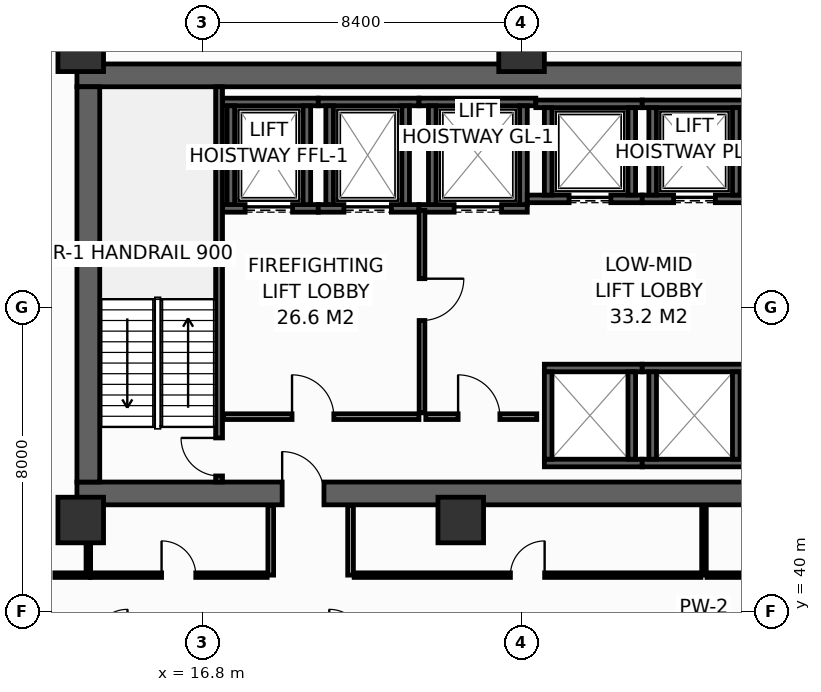
"""IFC4 building model, lengths in metres.
Left out: names, types, materials, properties, quantities, classifications, styles, units other than length and angle.
Written with IfcOpenShell. Run it as: python <this file> out.ifc"""

import sys

from ifc_helpers import new_model, si_unit, direction, frame, frame_2d, origin, origin_2d, place, context, subcontext, project, spatial, rectangle, hollow_rectangle, extrude, element, fill, save


model = new_model("IFC4")
c1 = context("Model", 3, precision=1e-05, world=origin(), true_north=direction((0.0, 1.0)))
c2 = subcontext(c1, "Body", "Model", "MODEL_VIEW")
j1 = project(units=[si_unit("LENGTHUNIT", "METRE"), si_unit("PLANEANGLEUNIT", "RADIAN")], contexts=[c1])
p1 = place(None, origin())
s1 = spatial("IfcSite", under=j1, at=p1, CompositionType="ELEMENT")
p2 = place(p1, origin())
s2 = spatial("IfcBuilding", under=s1, at=p2, CompositionType="ELEMENT")
p3 = place(p2, frame((0.0, 0.0, 92.8)))
s3 = spatial("IfcBuildingStorey", under=s2, at=p3, CompositionType="ELEMENT", Elevation=92.8)
p4 = place(p3, frame((13.5, 43.1, 0.0), z_axis=(0.0, 0.0, 1.0), x_axis=(1.0, 0.0, 0.0)))
e1 = element("IfcWall", 1, at=p4, inside=s3, PredefinedType="SHEAR", context=c2, shape_type="SweptSolid", body=[
    extrude(rectangle(XDim=32.9, YDim=0.6, at=frame_2d((16.45, 0.0))), origin(), (0.0, 0.0, 1.0), 4.15),
])
p5 = place(p4, frame((5.4, 0.0, 0.0)))
e2 = element("IfcOpeningElement", 2, at=p5, cuts=e1, PredefinedType="OPENING", context=c2, shape_type="SweptSolid", body=[
    extrude(rectangle(XDim=1.1, YDim=2.15, at=frame_2d((0.55, 1.075))), frame((0.0, 0.31, 0.0), z_axis=(0.0, -1.0, 0.0), x_axis=(1.0, 0.0, 0.0)), (0.0, 0.0, 1.0), 0.62),
])
p6 = place(p4, frame((25.6, 0.0, 0.0)))
e3 = element("IfcOpeningElement", 3, at=p6, cuts=e1, PredefinedType="OPENING", context=c2, shape_type="SweptSolid", body=[
    extrude(rectangle(XDim=1.1, YDim=2.15, at=frame_2d((0.55, 1.075))), frame((0.0, 0.31, 0.0), z_axis=(0.0, -1.0, 0.0), x_axis=(1.0, 0.0, 0.0)), (0.0, 0.0, 1.0), 0.62),
])
p7 = place(p3, frame((13.5, 54.1, 0.0), z_axis=(0.0, 0.0, 1.0), x_axis=(1.0, 0.0, 0.0)))
e4 = element("IfcWall", 4, at=p7, inside=s3, PredefinedType="SHEAR", context=c2, shape_type="SweptSolid", body=[
    extrude(rectangle(XDim=32.9, YDim=0.6, at=frame_2d((16.45, 0.0))), origin(), (0.0, 0.0, 1.0), 4.15),
])
p8 = place(p3, frame((13.8, 43.4, 0.0), z_axis=(0.0, 0.0, 1.0), x_axis=(0.0, 1.0, 0.0)))
e5 = element("IfcWall", 5, at=p8, inside=s3, PredefinedType="SHEAR", context=c2, shape_type="SweptSolid", body=[
    extrude(rectangle(XDim=10.4, YDim=0.6, at=frame_2d((5.2, 0.0))), origin(), (0.0, 0.0, 1.0), 4.15),
])
for number, where, z_axis, x_axis in (
    (6, (13.6, 54.8, 0.0), (0.0, 0.0, 1.0), (1.0, 0.0, 0.0)),
    (7, (25.2, 54.8, 0.0), (0.0, 0.0, 1.0), (1.0, 0.0, 0.0)),
    (8, (13.6, 42.4, 0.0), (0.0, 0.0, 1.0), (1.0, 0.0, 0.0)),
    (9, (23.6, 42.4, 0.0), (0.0, 0.0, 1.0), (1.0, 0.0, 0.0)),
):
    element("IfcColumn", number, at=place(p3, frame(where, z_axis=z_axis, x_axis=x_axis)), inside=s3, PredefinedType="COLUMN", context=c2, shape_type="SweptSolid", body=[
        extrude(hollow_rectangle(XDim=1.2, YDim=1.2, WallThickness=0.055, at=origin_2d()), origin(), (0.0, 0.0, 1.0), 4.4),
    ])
p9 = place(p3, frame((17.33, 50.6, 0.0), z_axis=(0.0, 0.0, 1.0), x_axis=(1.0, 0.0, 0.0)))
e10 = element("IfcWall", 10, at=p9, inside=s3, PredefinedType="SHEAR", context=c2, shape_type="SweptSolid", body=[
    extrude(rectangle(XDim=2.52, YDim=0.2, at=frame_2d((1.26, 0.0))), origin(), (0.0, 0.0, 1.0), 4.15),
])
p10 = place(p9, frame((0.595, 0.0, 0.0)))
e11 = element("IfcOpeningElement", 11, at=p10, cuts=e10, PredefinedType="OPENING", context=c2, shape_type="SweptSolid", body=[
    extrude(rectangle(XDim=1.25, YDim=2.3, at=frame_2d((0.625, 1.15))), frame((0.0, 0.11, 0.0), z_axis=(0.0, -1.0, 0.0), x_axis=(1.0, 0.0, 0.0)), (0.0, 0.0, 1.0), 0.22),
])
p11 = place(p3, frame((17.33, 53.4, 0.0), z_axis=(0.0, 0.0, 1.0), x_axis=(1.0, 0.0, 0.0)))
e12 = element("IfcWall", 12, at=p11, inside=s3, PredefinedType="SHEAR", context=c2, shape_type="SweptSolid", body=[
    extrude(rectangle(XDim=2.52, YDim=0.2, at=frame_2d((1.26, 0.0))), origin(), (0.0, 0.0, 1.0), 4.15),
])
for number, where, z_axis, x_axis in (
    (13, (17.55, 50.7, 0.0), (0.0, 0.0, 1.0), (0.0, 1.0, 0.0)),
    (14, (19.55, 50.7, 0.0), (0.0, 0.0, 1.0), (0.0, 1.0, 0.0)),
):
    element("IfcWall", number, at=place(p3, frame(where, z_axis=z_axis, x_axis=x_axis)), inside=s3, PredefinedType="SHEAR", context=c2, shape_type="SweptSolid", body=[
        extrude(rectangle(XDim=2.6, YDim=0.2, at=frame_2d((1.3, 0.0))), origin(), (0.0, 0.0, 1.0), 4.15),
    ])
p12 = place(p3, frame((19.85, 50.6, 0.0), z_axis=(0.0, 0.0, 1.0), x_axis=(1.0, 0.0, 0.0)))
e15 = element("IfcWall", 15, at=p12, inside=s3, PredefinedType="SHEAR", context=c2, shape_type="SweptSolid", body=[
    extrude(rectangle(XDim=2.65, YDim=0.2, at=frame_2d((1.325, 0.0))), origin(), (0.0, 0.0, 1.0), 4.15),
])
p13 = place(p12, frame((0.675, 0.0, 0.0)))
e16 = element("IfcOpeningElement", 16, at=p13, cuts=e15, PredefinedType="OPENING", context=c2, shape_type="SweptSolid", body=[
    extrude(rectangle(XDim=1.25, YDim=2.3, at=frame_2d((0.625, 1.15))), frame((0.0, 0.11, 0.0), z_axis=(0.0, -1.0, 0.0), x_axis=(1.0, 0.0, 0.0)), (0.0, 0.0, 1.0), 0.22),
])
p14 = place(p3, frame((19.85, 53.4, 0.0), z_axis=(0.0, 0.0, 1.0), x_axis=(1.0, 0.0, 0.0)))
e17 = element("IfcWall", 17, at=p14, inside=s3, PredefinedType="SHEAR", context=c2, shape_type="SweptSolid", body=[
    extrude(rectangle(XDim=2.65, YDim=0.2, at=frame_2d((1.325, 0.0))), origin(), (0.0, 0.0, 1.0), 4.15),
])
for number, where, z_axis, x_axis in (
    (18, (20.15, 50.7, 0.0), (0.0, 0.0, 1.0), (0.0, 1.0, 0.0)),
    (19, (22.15, 50.7, 0.0), (0.0, 0.0, 1.0), (0.0, 1.0, 0.0)),
):
    element("IfcWall", number, at=place(p3, frame(where, z_axis=z_axis, x_axis=x_axis)), inside=s3, PredefinedType="SHEAR", context=c2, shape_type="SweptSolid", body=[
        extrude(rectangle(XDim=2.6, YDim=0.2, at=frame_2d((1.3, 0.0))), origin(), (0.0, 0.0, 1.0), 4.15),
    ])
p15 = place(p3, frame((22.5, 50.6, 0.0), z_axis=(0.0, 0.0, 1.0), x_axis=(1.0, 0.0, 0.0)))
e20 = element("IfcWall", 20, at=p15, inside=s3, PredefinedType="SHEAR", context=c2, shape_type="SweptSolid", body=[
    extrude(rectangle(XDim=2.85, YDim=0.2, at=frame_2d((1.425, 0.0))), origin(), (0.0, 0.0, 1.0), 4.15),
])
p16 = place(p15, frame((0.925, 0.0, 0.0)))
e21 = element("IfcOpeningElement", 21, at=p16, cuts=e20, PredefinedType="OPENING", context=c2, shape_type="SweptSolid", body=[
    extrude(rectangle(XDim=1.25, YDim=2.3, at=frame_2d((0.625, 1.15))), frame((0.0, 0.11, 0.0), z_axis=(0.0, -1.0, 0.0), x_axis=(1.0, 0.0, 0.0)), (0.0, 0.0, 1.0), 0.22),
])
p17 = place(p3, frame((22.5, 53.4, 0.0), z_axis=(0.0, 0.0, 1.0), x_axis=(1.0, 0.0, 0.0)))
e22 = element("IfcWall", 22, at=p17, inside=s3, PredefinedType="SHEAR", context=c2, shape_type="SweptSolid", body=[
    extrude(rectangle(XDim=3.075, YDim=0.2, at=frame_2d((1.538, 0.0))), origin(), (0.0, 0.0, 1.0), 4.15),
])
for number, where, z_axis, x_axis in (
    (23, (22.85, 50.7, 0.0), (0.0, 0.0, 1.0), (0.0, 1.0, 0.0)),
    (24, (25.25, 50.7, 0.0), (0.0, 0.0, 1.0), (0.0, 1.0, 0.0)),
):
    element("IfcWall", number, at=place(p3, frame(where, z_axis=z_axis, x_axis=x_axis)), inside=s3, PredefinedType="SHEAR", context=c2, shape_type="SweptSolid", body=[
        extrude(rectangle(XDim=2.6, YDim=0.2, at=frame_2d((1.3, 0.0))), origin(), (0.0, 0.0, 1.0), 4.15),
    ])
p18 = place(p3, frame((25.35, 50.85, 0.0), z_axis=(0.0, 0.0, 1.0), x_axis=(1.0, 0.0, 0.0)))
e25 = element("IfcWall", 25, at=p18, inside=s3, PredefinedType="SHEAR", context=c2, shape_type="SweptSolid", body=[
    extrude(rectangle(XDim=3.025, YDim=0.2, at=frame_2d((1.512, 0.0))), origin(), (0.0, 0.0, 1.0), 4.15),
])
p19 = place(p18, frame((1.1, 0.0, 0.0)))
e26 = element("IfcOpeningElement", 26, at=p19, cuts=e25, PredefinedType="OPENING", context=c2, shape_type="SweptSolid", body=[
    extrude(rectangle(XDim=1.1, YDim=2.2, at=frame_2d((0.55, 1.1))), frame((0.0, 0.11, 0.0), z_axis=(0.0, -1.0, 0.0), x_axis=(1.0, 0.0, 0.0)), (0.0, 0.0, 1.0), 0.22),
])
p20 = place(p3, frame((25.575, 53.35, 0.0), z_axis=(0.0, 0.0, 1.0), x_axis=(1.0, 0.0, 0.0)))
e27 = element("IfcWall", 27, at=p20, inside=s3, PredefinedType="SHEAR", context=c2, shape_type="SweptSolid", body=[
    extrude(rectangle(XDim=2.8, YDim=0.2, at=frame_2d((1.4, 0.0))), origin(), (0.0, 0.0, 1.0), 4.15),
])
for number, where, z_axis, x_axis in (
    (28, (25.9, 50.95, 0.0), (0.0, 0.0, 1.0), (0.0, 1.0, 0.0)),
    (29, (28.1, 50.95, 0.0), (0.0, 0.0, 1.0), (0.0, 1.0, 0.0)),
):
    element("IfcWall", number, at=place(p3, frame(where, z_axis=z_axis, x_axis=x_axis)), inside=s3, PredefinedType="SHEAR", context=c2, shape_type="SweptSolid", body=[
        extrude(rectangle(XDim=2.3, YDim=0.2, at=frame_2d((1.15, 0.0))), origin(), (0.0, 0.0, 1.0), 4.15),
    ])
p21 = place(p3, frame((28.375, 50.85, 0.0), z_axis=(0.0, 0.0, 1.0), x_axis=(1.0, 0.0, 0.0)))
e30 = element("IfcWall", 30, at=p21, inside=s3, PredefinedType="SHEAR", context=c2, shape_type="SweptSolid", body=[
    extrude(rectangle(XDim=2.75, YDim=0.2, at=frame_2d((1.375, 0.0))), origin(), (0.0, 0.0, 1.0), 4.15),
])
p22 = place(p21, frame((0.825, 0.0, 0.0)))
e31 = element("IfcOpeningElement", 31, at=p22, cuts=e30, PredefinedType="OPENING", context=c2, shape_type="SweptSolid", body=[
    extrude(rectangle(XDim=1.1, YDim=2.2, at=frame_2d((0.55, 1.1))), frame((0.0, 0.11, 0.0), z_axis=(0.0, -1.0, 0.0), x_axis=(1.0, 0.0, 0.0)), (0.0, 0.0, 1.0), 0.22),
])
p23 = place(p3, frame((28.375, 53.35, 0.0), z_axis=(0.0, 0.0, 1.0), x_axis=(1.0, 0.0, 0.0)))
e32 = element("IfcWall", 32, at=p23, inside=s3, PredefinedType="SHEAR", context=c2, shape_type="SweptSolid", body=[
    extrude(rectangle(XDim=2.75, YDim=0.2, at=frame_2d((1.375, 0.0))), origin(), (0.0, 0.0, 1.0), 4.15),
])
for number, where, z_axis, x_axis in (
    (33, (28.65, 50.95, 0.0), (0.0, 0.0, 1.0), (0.0, 1.0, 0.0)),
    (34, (30.85, 50.95, 0.0), (0.0, 0.0, 1.0), (0.0, 1.0, 0.0)),
):
    element("IfcWall", number, at=place(p3, frame(where, z_axis=z_axis, x_axis=x_axis)), inside=s3, PredefinedType="SHEAR", context=c2, shape_type="SweptSolid", body=[
        extrude(rectangle(XDim=2.3, YDim=0.2, at=frame_2d((1.15, 0.0))), origin(), (0.0, 0.0, 1.0), 4.15),
    ])
for number, where, z_axis, x_axis in (
    (35, (25.8, 43.9, 0.0), (0.0, 0.0, 1.0), (1.0, 0.0, 0.0)),
    (36, (25.8, 46.4, 0.0), (0.0, 0.0, 1.0), (1.0, 0.0, 0.0)),
):
    element("IfcWall", number, at=place(p3, frame(where, z_axis=z_axis, x_axis=x_axis)), inside=s3, PredefinedType="SHEAR", context=c2, shape_type="SweptSolid", body=[
        extrude(rectangle(XDim=2.575, YDim=0.2, at=frame_2d((1.288, 0.0))), origin(), (0.0, 0.0, 1.0), 4.15),
    ])
for number, where, z_axis, x_axis in (
    (37, (25.9, 44.0, 0.0), (0.0, 0.0, 1.0), (0.0, 1.0, 0.0)),
    (38, (28.1, 44.0, 0.0), (0.0, 0.0, 1.0), (0.0, 1.0, 0.0)),
):
    element("IfcWall", number, at=place(p3, frame(where, z_axis=z_axis, x_axis=x_axis)), inside=s3, PredefinedType="SHEAR", context=c2, shape_type="SweptSolid", body=[
        extrude(rectangle(XDim=2.3, YDim=0.2, at=frame_2d((1.15, 0.0))), origin(), (0.0, 0.0, 1.0), 4.15),
    ])
for number, where, z_axis, x_axis in (
    (39, (28.375, 43.9, 0.0), (0.0, 0.0, 1.0), (1.0, 0.0, 0.0)),
    (40, (28.375, 46.4, 0.0), (0.0, 0.0, 1.0), (1.0, 0.0, 0.0)),
):
    element("IfcWall", number, at=place(p3, frame(where, z_axis=z_axis, x_axis=x_axis)), inside=s3, PredefinedType="SHEAR", context=c2, shape_type="SweptSolid", body=[
        extrude(rectangle(XDim=2.75, YDim=0.2, at=frame_2d((1.375, 0.0))), origin(), (0.0, 0.0, 1.0), 4.15),
    ])
for number, where, z_axis, x_axis in (
    (41, (28.65, 44.0, 0.0), (0.0, 0.0, 1.0), (0.0, 1.0, 0.0)),
    (42, (30.85, 44.0, 0.0), (0.0, 0.0, 1.0), (0.0, 1.0, 0.0)),
):
    element("IfcWall", number, at=place(p3, frame(where, z_axis=z_axis, x_axis=x_axis)), inside=s3, PredefinedType="SHEAR", context=c2, shape_type="SweptSolid", body=[
        extrude(rectangle(XDim=2.3, YDim=0.2, at=frame_2d((1.15, 0.0))), origin(), (0.0, 0.0, 1.0), 4.15),
    ])
p24 = place(p3, frame((17.24, 43.4, 0.0), z_axis=(0.0, 0.0, 1.0), x_axis=(0.0, 1.0, 0.0)))
e43 = element("IfcWall", 43, at=p24, inside=s3, PredefinedType="SHEAR", context=c2, shape_type="SweptSolid", body=[
    extrude(rectangle(XDim=10.4, YDim=0.18, at=frame_2d((5.2, 0.0))), origin(), (0.0, 0.0, 1.0), 4.15),
])
p25 = place(p24, frame((0.16, 0.0, 0.0)))
e44 = element("IfcOpeningElement", 44, at=p25, cuts=e43, PredefinedType="OPENING", context=c2, shape_type="SweptSolid", body=[
    extrude(rectangle(XDim=1.0, YDim=2.15, at=frame_2d((0.5, 1.075))), frame((0.0, 0.1, 0.0), z_axis=(0.0, -1.0, 0.0), x_axis=(1.0, 0.0, 0.0)), (0.0, 0.0, 1.0), 0.2),
])
p26 = place(p3, frame((17.36, 45.12, 0.0), z_axis=(0.0, 0.0, 1.0), x_axis=(1.0, 0.0, 0.0)))
e45 = element("IfcWall", 45, at=p26, inside=s3, PredefinedType="PARTITIONING", context=c2, shape_type="SweptSolid", body=[
    extrude(rectangle(XDim=5.14, YDim=0.15, at=frame_2d((2.57, 0.0))), origin(), (0.0, 0.0, 1.0), 4.15),
])
p27 = place(p26, frame((1.8, 0.0, 0.0)))
e46 = element("IfcOpeningElement", 46, at=p27, cuts=e45, PredefinedType="OPENING", context=c2, shape_type="SweptSolid", body=[
    extrude(rectangle(XDim=1.1, YDim=2.15, at=frame_2d((0.55, 1.075))), frame((0.0, 0.085, 0.0), z_axis=(0.0, -1.0, 0.0), x_axis=(1.0, 0.0, 0.0)), (0.0, 0.0, 1.0), 0.17),
])
p28 = place(p3, frame((22.58, 50.55, 0.0), z_axis=(0.0, 0.0, 1.0), x_axis=(0.0, -1.0, 0.0)))
e47 = element("IfcWall", 47, at=p28, inside=s3, PredefinedType="PARTITIONING", context=c2, shape_type="SweptSolid", body=[
    extrude(rectangle(XDim=5.33, YDim=0.15, at=frame_2d((2.665, 0.0))), origin(), (0.0, 0.0, 1.0), 4.15),
])
p29 = place(p28, frame((1.8, 0.0, 0.0)))
e48 = element("IfcOpeningElement", 48, at=p29, cuts=e47, PredefinedType="OPENING", context=c2, shape_type="SweptSolid", body=[
    extrude(rectangle(XDim=1.1, YDim=2.15, at=frame_2d((0.55, 1.075))), frame((0.0, 0.085, 0.0), z_axis=(0.0, -1.0, 0.0), x_axis=(1.0, 0.0, 0.0)), (0.0, 0.0, 1.0), 0.17),
])
p30 = place(p3, frame((22.68, 45.12, 0.0), z_axis=(0.0, 0.0, 1.0), x_axis=(1.0, 0.0, 0.0)))
e49 = element("IfcWall", 49, at=p30, inside=s3, PredefinedType="PARTITIONING", context=c2, shape_type="SweptSolid", body=[
    extrude(rectangle(XDim=2.92, YDim=0.15, at=frame_2d((1.46, 0.0))), origin(), (0.0, 0.0, 1.0), 4.15),
])
p31 = place(p30, frame((0.85, 0.0, 0.0)))
e50 = element("IfcOpeningElement", 50, at=p31, cuts=e49, PredefinedType="OPENING", context=c2, shape_type="SweptSolid", body=[
    extrude(rectangle(XDim=1.1, YDim=2.15, at=frame_2d((0.55, 1.075))), frame((0.0, 0.085, 0.0), z_axis=(0.0, -1.0, 0.0), x_axis=(1.0, 0.0, 0.0)), (0.0, 0.0, 1.0), 0.17),
])
p32 = place(p3, frame((12.92, 40.95, 0.0), z_axis=(0.0, 0.0, 1.0), x_axis=(1.0, 0.0, 0.0)))
e51 = element("IfcWall", 51, at=p32, inside=s3, PredefinedType="PARTITIONING", context=c2, shape_type="SweptSolid", body=[
    extrude(rectangle(XDim=0.93, YDim=0.12, at=frame_2d((0.465, 0.0))), origin(), (0.0, 0.0, 1.0), 4.15),
])
p33 = place(p3, frame((13.8, 41.03, 0.0), z_axis=(0.0, 0.0, 1.0), x_axis=(0.0, 1.0, 0.0)))
e52 = element("IfcWall", 52, at=p33, inside=s3, PredefinedType="PARTITIONING", context=c2, shape_type="SweptSolid", body=[
    extrude(rectangle(XDim=1.75, YDim=0.12, at=frame_2d((0.875, 0.0))), origin(), (0.0, 0.0, 1.0), 4.15),
])
for number, where, z_axis, x_axis in (
    (53, (18.6, 40.95, 0.0), (0.0, 0.0, 1.0), (0.0, 1.0, 0.0)),
    (54, (20.7, 40.95, 0.0), (0.0, 0.0, 1.0), (0.0, 1.0, 0.0)),
):
    element("IfcWall", number, at=place(p3, frame(where, z_axis=z_axis, x_axis=x_axis)), inside=s3, PredefinedType="PARTITIONING", context=c2, shape_type="SweptSolid", body=[
        extrude(rectangle(XDim=1.83, YDim=0.15, at=frame_2d((0.915, 0.0))), origin(), (0.0, 0.0, 1.0), 4.15),
    ])
p34 = place(p3, frame((13.85, 40.95, 0.0), z_axis=(0.0, 0.0, 1.0), x_axis=(1.0, 0.0, 0.0)))
e55 = element("IfcWall", 55, at=p34, inside=s3, PredefinedType="PARTITIONING", context=c2, shape_type="SweptSolid", body=[
    extrude(rectangle(XDim=4.655, YDim=0.12, at=frame_2d((2.327, 0.0))), origin(), (0.0, 0.0, 1.0), 4.15),
])
p35 = place(p34, frame((1.877, 0.0, 0.0)))
e56 = element("IfcOpeningElement", 56, at=p35, cuts=e55, PredefinedType="OPENING", context=c2, shape_type="SweptSolid", body=[
    extrude(rectangle(XDim=0.9, YDim=2.1, at=frame_2d((0.45, 1.05))), frame((0.0, 0.07, 0.0), z_axis=(0.0, -1.0, 0.0), x_axis=(1.0, 0.0, 0.0)), (0.0, 0.0, 1.0), 0.14),
])
p36 = place(p3, frame((30.0, 40.95, 0.0), z_axis=(0.0, 0.0, 1.0), x_axis=(0.0, 1.0, 0.0)))
e57 = element("IfcWall", 57, at=p36, inside=s3, PredefinedType="PARTITIONING", context=c2, shape_type="SweptSolid", body=[
    extrude(rectangle(XDim=1.83, YDim=0.12, at=frame_2d((0.915, 0.0))), origin(), (0.0, 0.0, 1.0), 3.335),
])
p37 = place(p3, frame((20.795, 40.95, 0.0), z_axis=(0.0, 0.0, 1.0), x_axis=(1.0, 0.0, 0.0)))
e58 = element("IfcWall", 58, at=p37, inside=s3, PredefinedType="PARTITIONING", context=c2, shape_type="SweptSolid", body=[
    extrude(rectangle(XDim=9.125, YDim=0.12, at=frame_2d((4.562, 0.0))), origin(), (0.0, 0.0, 1.0), 3.335),
])
p38 = place(p37, frame((4.112, 0.0, 0.0)))
e59 = element("IfcOpeningElement", 59, at=p38, cuts=e58, PredefinedType="OPENING", context=c2, shape_type="SweptSolid", body=[
    extrude(rectangle(XDim=0.9, YDim=2.1, at=frame_2d((0.45, 1.05))), frame((0.0, 0.07, 0.0), z_axis=(0.0, -1.0, 0.0), x_axis=(1.0, 0.0, 0.0)), (0.0, 0.0, 1.0), 0.14),
])
p39 = place(p3, frame((30.08, 40.95, 0.0), z_axis=(0.0, 0.0, 1.0), x_axis=(1.0, 0.0, 0.0)))
e60 = element("IfcWall", 60, at=p39, inside=s3, PredefinedType="PARTITIONING", context=c2, shape_type="SweptSolid", body=[
    extrude(rectangle(XDim=8.625, YDim=0.12, at=frame_2d((4.312, 0.0))), origin(), (0.0, 0.0, 1.0), 3.335),
])
p40 = place(p39, frame((3.788, 0.0, 0.0)))
e61 = element("IfcOpeningElement", 61, at=p40, cuts=e60, PredefinedType="OPENING", context=c2, shape_type="SweptSolid", body=[
    extrude(rectangle(XDim=1.05, YDim=2.15, at=frame_2d((0.525, 1.075))), frame((0.0, 0.07, 0.0), z_axis=(0.0, -1.0, 0.0), x_axis=(1.0, 0.0, 0.0)), (0.0, 0.0, 1.0), 0.14),
])
p41 = place(p10, origin())
e62 = element("IfcDoor", 62, at=p41, inside=s3, OperationType="SLIDING_TO_LEFT", PredefinedType="DOOR", context=c2, shape_type="SweptSolid", body=[
    extrude(rectangle(XDim=1.25, YDim=2.3, at=frame_2d((0.625, 1.15))), frame((0.0, 0.025, 0.0), z_axis=(0.0, -1.0, 0.0), x_axis=(1.0, 0.0, 0.0)), (0.0, 0.0, 1.0), 0.05),
])
fill(e11, e62)
p42 = place(p13, origin())
e63 = element("IfcDoor", 63, at=p42, inside=s3, OperationType="SLIDING_TO_LEFT", PredefinedType="DOOR", context=c2, shape_type="SweptSolid", body=[
    extrude(rectangle(XDim=1.25, YDim=2.3, at=frame_2d((0.625, 1.15))), frame((0.0, 0.025, 0.0), z_axis=(0.0, -1.0, 0.0), x_axis=(1.0, 0.0, 0.0)), (0.0, 0.0, 1.0), 0.05),
])
fill(e16, e63)
p43 = place(p16, origin())
e64 = element("IfcDoor", 64, at=p43, inside=s3, OperationType="SLIDING_TO_LEFT", PredefinedType="DOOR", context=c2, shape_type="SweptSolid", body=[
    extrude(rectangle(XDim=1.25, YDim=2.3, at=frame_2d((0.625, 1.15))), frame((0.0, 0.025, 0.0), z_axis=(0.0, -1.0, 0.0), x_axis=(1.0, 0.0, 0.0)), (0.0, 0.0, 1.0), 0.05),
])
fill(e21, e64)
p44 = place(p19, origin())
e65 = element("IfcDoor", 65, at=p44, inside=s3, OperationType="SLIDING_TO_LEFT", PredefinedType="DOOR", context=c2, shape_type="SweptSolid", body=[
    extrude(rectangle(XDim=1.1, YDim=2.2, at=frame_2d((0.55, 1.1))), frame((0.0, 0.025, 0.0), z_axis=(0.0, -1.0, 0.0), x_axis=(1.0, 0.0, 0.0)), (0.0, 0.0, 1.0), 0.05),
])
fill(e26, e65)
p45 = place(p22, origin())
e66 = element("IfcDoor", 66, at=p45, inside=s3, OperationType="SLIDING_TO_LEFT", PredefinedType="DOOR", context=c2, shape_type="SweptSolid", body=[
    extrude(rectangle(XDim=1.1, YDim=2.2, at=frame_2d((0.55, 1.1))), frame((0.0, 0.025, 0.0), z_axis=(0.0, -1.0, 0.0), x_axis=(1.0, 0.0, 0.0)), (0.0, 0.0, 1.0), 0.05),
])
fill(e31, e66)
p46 = place(p25, origin())
e67 = element("IfcDoor", 67, at=p46, inside=s3, OperationType="SINGLE_SWING_RIGHT", PredefinedType="DOOR", context=c2, shape_type="SweptSolid", body=[
    extrude(rectangle(XDim=1.0, YDim=2.15, at=frame_2d((0.5, 1.075))), frame((0.0, 0.025, 0.0), z_axis=(0.0, -1.0, 0.0), x_axis=(1.0, 0.0, 0.0)), (0.0, 0.0, 1.0), 0.05),
])
fill(e44, e67)
p47 = place(p27, origin())
e68 = element("IfcDoor", 68, at=p47, inside=s3, OperationType="SINGLE_SWING_LEFT", PredefinedType="DOOR", context=c2, shape_type="SweptSolid", body=[
    extrude(rectangle(XDim=1.1, YDim=2.15, at=frame_2d((0.55, 1.075))), frame((0.0, 0.025, 0.0), z_axis=(0.0, -1.0, 0.0), x_axis=(1.0, 0.0, 0.0)), (0.0, 0.0, 1.0), 0.05),
])
fill(e46, e68)
p48 = place(p29, origin())
e69 = element("IfcDoor", 69, at=p48, inside=s3, OperationType="SINGLE_SWING_LEFT", PredefinedType="DOOR", context=c2, shape_type="SweptSolid", body=[
    extrude(rectangle(XDim=1.1, YDim=2.15, at=frame_2d((0.55, 1.075))), frame((0.0, 0.025, 0.0), z_axis=(0.0, -1.0, 0.0), x_axis=(1.0, 0.0, 0.0)), (0.0, 0.0, 1.0), 0.05),
])
fill(e48, e69)
p49 = place(p31, origin())
e70 = element("IfcDoor", 70, at=p49, inside=s3, OperationType="SINGLE_SWING_LEFT", PredefinedType="DOOR", context=c2, shape_type="SweptSolid", body=[
    extrude(rectangle(XDim=1.1, YDim=2.15, at=frame_2d((0.55, 1.075))), frame((0.0, 0.025, 0.0), z_axis=(0.0, -1.0, 0.0), x_axis=(1.0, 0.0, 0.0)), (0.0, 0.0, 1.0), 0.05),
])
fill(e50, e70)
p50 = place(p5, origin())
e71 = element("IfcDoor", 71, at=p50, inside=s3, OperationType="SINGLE_SWING_LEFT", PredefinedType="DOOR", context=c2, shape_type="SweptSolid", body=[
    extrude(rectangle(XDim=1.1, YDim=2.15, at=frame_2d((0.55, 1.075))), frame((0.0, 0.025, 0.0), z_axis=(0.0, -1.0, 0.0), x_axis=(1.0, 0.0, 0.0)), (0.0, 0.0, 1.0), 0.05),
])
fill(e2, e71)
p51 = place(p35, origin())
e72 = element("IfcDoor", 72, at=p51, inside=s3, OperationType="SINGLE_SWING_LEFT", PredefinedType="DOOR", context=c2, shape_type="SweptSolid", body=[
    extrude(rectangle(XDim=0.9, YDim=2.1, at=frame_2d((0.45, 1.05))), frame((0.0, 0.025, 0.0), z_axis=(0.0, -1.0, 0.0), x_axis=(1.0, 0.0, 0.0)), (0.0, 0.0, 1.0), 0.05),
])
fill(e56, e72)
p52 = place(p38, origin())
e73 = element("IfcDoor", 73, at=p52, inside=s3, OperationType="SINGLE_SWING_RIGHT", PredefinedType="DOOR", context=c2, shape_type="SweptSolid", body=[
    extrude(rectangle(XDim=0.9, YDim=2.1, at=frame_2d((0.45, 1.05))), frame((0.0, 0.025, 0.0), z_axis=(0.0, -1.0, 0.0), x_axis=(1.0, 0.0, 0.0)), (0.0, 0.0, 1.0), 0.05),
])
fill(e59, e73)
save(model, sys.argv[1])
